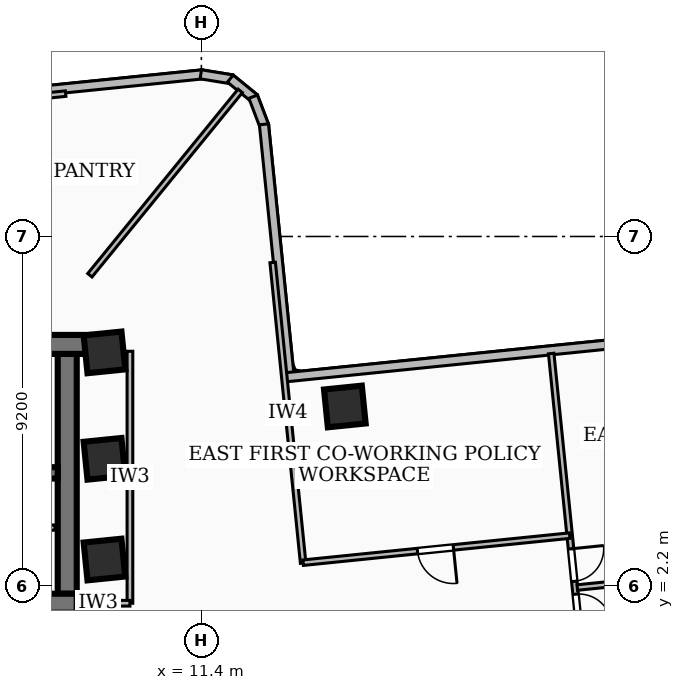
"""IFC4 building model, lengths in metres.
Left out: names, types, materials, properties, quantities, classifications, styles, units other than length and angle.
Written with IfcOpenShell. Run it as: python <this file> out.ifc"""

import sys

from ifc_helpers import new_model, si_unit, direction, frame, frame_2d, origin, origin_2d, place, context, subcontext, project, spatial, rectangle, extrude, element, fill, save


model = new_model("IFC4")
c1 = context("Model", 3, precision=1e-05, world=origin(), true_north=direction((0.0, 1.0)))
c2 = subcontext(c1, "Body", "Model", "MODEL_VIEW")
j1 = project(units=[si_unit("LENGTHUNIT", "METRE"), si_unit("PLANEANGLEUNIT", "RADIAN")], contexts=[c1])
p1 = place(None, origin())
s1 = spatial("IfcSite", under=j1, at=p1, CompositionType="ELEMENT")
p2 = place(p1, origin())
s2 = spatial("IfcBuilding", under=s1, at=p2, CompositionType="ELEMENT")
p3 = place(p2, frame((0.0, 0.0, 74.88)))
s3 = spatial("IfcBuildingStorey", under=s2, at=p3, CompositionType="ELEMENT", Elevation=74.88)
p4 = place(p3, frame((-8.78, 8.56, 0.0), z_axis=(0.0, 0.0, 1.0), x_axis=(1.0, 0.0, 0.0)))
e1 = element("IfcWall", 1, at=p4, inside=s3, PredefinedType="SHEAR", context=c2, shape_type="SweptSolid", body=[
    extrude(rectangle(XDim=17.56, YDim=0.5, at=frame_2d((8.78, 0.0))), origin(), (0.0, 0.0, 1.0), 3.34),
])
p5 = place(p3, frame((8.12, 1.75, 0.0), z_axis=(0.0, 0.0, 1.0), x_axis=(-1.0, 0.0, 0.0)))
e2 = element("IfcWall", 2, at=p5, inside=s3, PredefinedType="SHEAR", context=c2, shape_type="SweptSolid", body=[
    extrude(rectangle(XDim=16.24, YDim=0.5, at=frame_2d((8.12, 0.0))), origin(), (0.0, 0.0, 1.0), 3.34),
])
p6 = place(p5, frame((7.45, 0.0, 0.0)))
e3 = element("IfcOpeningElement", 3, at=p6, cuts=e2, PredefinedType="OPENING", context=c2, shape_type="SweptSolid", body=[
    extrude(rectangle(XDim=1.0, YDim=2.1, at=frame_2d((0.5, 1.05))), frame((0.0, 0.26, 0.0), z_axis=(0.0, -1.0, 0.0), x_axis=(1.0, 0.0, 0.0)), (0.0, 0.0, 1.0), 0.52),
])
p7 = place(p5, frame((3.4, 0.0, 0.0)))
e4 = element("IfcOpeningElement", 4, at=p7, cuts=e2, PredefinedType="OPENING", context=c2, shape_type="SweptSolid", body=[
    extrude(rectangle(XDim=0.9, YDim=2.06, at=frame_2d((0.45, 1.03))), frame((0.0, 0.26, 0.0), z_axis=(0.0, -1.0, 0.0), x_axis=(1.0, 0.0, 0.0)), (0.0, 0.0, 1.0), 0.52),
])
p8 = place(p5, frame((1.1, 0.0, 0.0)))
e5 = element("IfcOpeningElement", 5, at=p8, cuts=e2, PredefinedType="OPENING", context=c2, shape_type="SweptSolid", body=[
    extrude(rectangle(XDim=0.9, YDim=2.06, at=frame_2d((0.45, 1.03))), frame((0.0, 0.26, 0.0), z_axis=(0.0, -1.0, 0.0), x_axis=(1.0, 0.0, 0.0)), (0.0, 0.0, 1.0), 0.52),
])
p9 = place(p3, frame((7.87, 8.31, 0.0), z_axis=(0.0, 0.0, 1.0), x_axis=(0.0, -1.0, 0.0)))
e6 = element("IfcWall", 6, at=p9, inside=s3, PredefinedType="SHEAR", context=c2, shape_type="SweptSolid", body=[
    extrude(rectangle(XDim=6.31, YDim=0.5, at=frame_2d((3.155, 0.0))), origin(), (0.0, 0.0, 1.0), 3.34),
])
p10 = place(p3, frame((7.62, 5.18, 0.0), z_axis=(0.0, 0.0, 1.0), x_axis=(-1.0, 0.0, 0.0)))
e7 = element("IfcWall", 7, at=p10, inside=s3, PredefinedType="SOLIDWALL", context=c2, shape_type="SweptSolid", body=[
    extrude(rectangle(XDim=15.24, YDim=0.3, at=frame_2d((7.62, 0.0))), origin(), (0.0, 0.0, 1.0), 3.34),
])
p11 = place(p10, frame((5.77, 0.0, 0.0)))
e8 = element("IfcOpeningElement", 8, at=p11, cuts=e7, PredefinedType="OPENING", context=c2, shape_type="SweptSolid", body=[
    extrude(rectangle(XDim=1.1, YDim=2.15, at=frame_2d((0.55, 1.075))), frame((0.0, 0.16, 0.0), z_axis=(0.0, -1.0, 0.0), x_axis=(1.0, 0.0, 0.0)), (0.0, 0.0, 1.0), 0.32),
])
p12 = place(p10, frame((2.97, 0.0, 0.0)))
e9 = element("IfcOpeningElement", 9, at=p12, cuts=e7, PredefinedType="OPENING", context=c2, shape_type="SweptSolid", body=[
    extrude(rectangle(XDim=1.1, YDim=2.15, at=frame_2d((0.55, 1.075))), frame((0.0, 0.16, 0.0), z_axis=(0.0, -1.0, 0.0), x_axis=(1.0, 0.0, 0.0)), (0.0, 0.0, 1.0), 0.32),
])
p13 = place(p10, frame((7.97, 0.0, 0.0)))
e10 = element("IfcOpeningElement", 10, at=p13, cuts=e7, PredefinedType="OPENING", context=c2, shape_type="SweptSolid", body=[
    extrude(rectangle(XDim=1.0, YDim=2.1, at=frame_2d((0.5, 1.05))), frame((0.0, 0.16, 0.0), z_axis=(0.0, -1.0, 0.0), x_axis=(1.0, 0.0, 0.0)), (0.0, 0.0, 1.0), 0.32),
])
for number, where, z_axis, x_axis in (
    (11, (8.85, 2.9, 0.0), (0.0, 0.0, 1.0), (0.995, 0.101, 0.0)),
    (12, (8.85, 5.55, 0.0), (0.0, 0.0, 1.0), (0.995, 0.101, 0.0)),
    (13, (8.85, 8.35, 0.0), (0.0, 0.0, 1.0), (0.995, 0.101, 0.0)),
    (14, (15.175, 6.927, 0.0), (0.0, 0.0, 1.0), (0.995, 0.101, 0.0)),
):
    element("IfcColumn", number, at=place(p3, frame(where, z_axis=z_axis, x_axis=x_axis)), inside=s3, PredefinedType="COLUMN", context=c2, shape_type="SweptSolid", body=[
        extrude(rectangle(XDim=1.0, YDim=1.0, at=origin_2d()), origin(), (0.0, 0.0, 1.0), 3.6),
    ])
p14 = place(p3, frame((4.694, 14.981, 0.0), z_axis=(0.0, 0.0, 1.0), x_axis=(0.994875719665, 0.101105402534, 0.0)))
e15 = element("IfcWall", 15, at=p14, inside=s3, PredefinedType="SOLIDWALL", context=c2, shape_type="SweptSolid", body=[
    extrude(rectangle(XDim=6.776, YDim=0.24, at=frame_2d((3.388, 0.0))), origin(), (0.0, 0.0, 1.0), 2.486),
])
p15 = place(p3, frame((11.385, 15.667, 0.0), z_axis=(0.0, 0.0, 1.0), x_axis=(0.987091669755, -0.160156284613, 0.0)))
e16 = element("IfcWall", 16, at=p15, inside=s3, PredefinedType="SOLIDWALL", context=c2, shape_type="SweptSolid", body=[
    extrude(rectangle(XDim=0.831, YDim=0.24, at=frame_2d((0.416, 0.0))), origin(), (0.0, 0.0, 1.0), 3.34),
])
p16 = place(p3, frame((12.161, 15.554, 0.0), z_axis=(0.0, 0.0, 1.0), x_axis=(0.774946287969, -0.632027096542, 0.0)))
e17 = element("IfcWall", 17, at=p16, inside=s3, PredefinedType="SOLIDWALL", context=c2, shape_type="SweptSolid", body=[
    extrude(rectangle(XDim=0.813, YDim=0.24, at=frame_2d((0.407, 0.0))), origin(), (0.0, 0.0, 1.0), 3.34),
])
p17 = place(p3, frame((12.763, 15.079, 0.0), z_axis=(0.0, 0.0, 1.0), x_axis=(0.355469529522, -0.934687869602, 0.0)))
e18 = element("IfcWall", 18, at=p17, inside=s3, PredefinedType="SOLIDWALL", context=c2, shape_type="SweptSolid", body=[
    extrude(rectangle(XDim=0.83, YDim=0.24, at=frame_2d((0.415, 0.0))), origin(), (0.0, 0.0, 1.0), 3.34),
])
p18 = place(p3, frame((13.046, 14.351, 0.0), z_axis=(0.0, 0.0, 1.0), x_axis=(0.101248053545, -0.994861212257, 0.0)))
e19 = element("IfcWall", 19, at=p18, inside=s3, PredefinedType="SOLIDWALL", context=c2, shape_type="SweptSolid", body=[
    extrude(rectangle(XDim=6.776, YDim=0.24, at=frame_2d((3.388, 0.0))), origin(), (0.0, 0.0, 1.0), 2.644),
])
p19 = place(p3, frame((13.626, 7.696, 0.0), z_axis=(0.0, 0.0, 1.0), x_axis=(0.994872930989, 0.101132839298, 0.0)))
e20 = element("IfcWall", 20, at=p19, inside=s3, PredefinedType="SOLIDWALL", context=c2, shape_type="SweptSolid", body=[
    extrude(rectangle(XDim=16.276, YDim=0.24, at=frame_2d((8.138, 0.0))), origin(), (0.0, 0.0, 1.0), 2.644),
])
p20 = place(p3, frame((2.9, 3.74, 0.0), z_axis=(0.0, 0.0, 1.0), x_axis=(1.0, 0.0, 0.0)))
e21 = element("IfcWall", 21, at=p20, inside=s3, PredefinedType="PARTITIONING", context=c2, shape_type="SweptSolid", body=[
    extrude(rectangle(XDim=4.65, YDim=0.138, at=frame_2d((2.325, 0.0))), origin(), (0.0, 0.0, 1.0), 3.34),
])
p21 = place(p3, frame((9.52, 1.75, 0.0), z_axis=(0.0, 0.0, 1.0), x_axis=(0.0, 1.0, 0.0)))
e22 = element("IfcWall", 22, at=p21, inside=s3, PredefinedType="PARTITIONING", context=c2, shape_type="SweptSolid", body=[
    extrude(rectangle(XDim=6.63, YDim=0.15, at=frame_2d((3.315, 0.0))), origin(), (0.0, 0.0, 1.0), 2.486),
])
p22 = place(p3, frame((7.85, 1.75, 0.0), z_axis=(0.0, 0.0, 1.0), x_axis=(1.0, 0.0, 0.0)))
e23 = element("IfcWall", 23, at=p22, inside=s3, PredefinedType="PARTITIONING", context=c2, shape_type="SweptSolid", body=[
    extrude(rectangle(XDim=1.67, YDim=0.15, at=frame_2d((0.835, 0.0))), origin(), (0.0, 0.0, 1.0), 2.405),
])
p23 = place(p3, frame((8.466, 10.38, 0.0), z_axis=(0.0, 0.0, 1.0), x_axis=(0.631992375104, 0.774974604623, 0.0)))
e24 = element("IfcWall", 24, at=p23, inside=s3, PredefinedType="PARTITIONING", context=c2, shape_type="SweptSolid", body=[
    extrude(rectangle(XDim=6.26, YDim=0.145, at=frame_2d((3.13, 0.0))), origin(), (0.0, 0.0, 1.0), 2.644),
])
p24 = place(p3, frame((14.078, 2.807, 0.0), z_axis=(0.0, 0.0, 1.0), x_axis=(-0.100884076592, 0.994898187299, 0.0)))
e25 = element("IfcWall", 25, at=p24, inside=s3, PredefinedType="PARTITIONING", context=c2, shape_type="SweptSolid", body=[
    extrude(rectangle(XDim=7.95, YDim=0.145, at=frame_2d((3.975, 0.0))), origin(), (0.0, 0.0, 1.0), 2.486),
])
p25 = place(p3, frame((21.091, 3.529, 0.0), z_axis=(0.0, 0.0, 1.0), x_axis=(-0.994885188523, -0.101012185692, 0.0)))
e26 = element("IfcWall", 26, at=p25, inside=s3, PredefinedType="PARTITIONING", context=c2, shape_type="SweptSolid", body=[
    extrude(rectangle(XDim=7.05, YDim=0.145, at=frame_2d((3.525, 0.0))), origin(), (0.0, 0.0, 1.0), 3.34),
])
p26 = place(p25, frame((3.075, 0.0, 0.0)))
e27 = element("IfcOpeningElement", 27, at=p26, cuts=e26, PredefinedType="OPENING", context=c2, shape_type="SweptSolid", body=[
    extrude(rectangle(XDim=0.95, YDim=2.08, at=frame_2d((0.475, 1.04))), frame((0.0, 0.083, 0.0), z_axis=(0.0, -1.0, 0.0), x_axis=(1.0, 0.0, 0.0)), (0.0, 0.0, 1.0), 0.165),
])
p27 = place(p3, frame((21.29, 2.163, 0.0), z_axis=(0.0, 0.0, 1.0), x_axis=(0.994879916843, 0.101064093832, 0.0)))
e28 = element("IfcWall", 28, at=p27, inside=s3, PredefinedType="PARTITIONING", context=c2, shape_type="SweptSolid", body=[
    extrude(rectangle(XDim=10.595, YDim=0.145, at=frame_2d((5.298, 0.0))), origin(), (0.0, 0.0, 1.0), 2.793),
])
p28 = place(p3, frame((20.605, 8.32, 0.0), z_axis=(0.0, 0.0, 1.0), x_axis=(0.101040883761, -0.994882274346, 0.0)))
e29 = element("IfcWall", 29, at=p28, inside=s3, PredefinedType="PARTITIONING", context=c2, shape_type="SweptSolid", body=[
    extrude(rectangle(XDim=12.391, YDim=0.145, at=frame_2d((6.195, 0.0))), origin(), (0.0, 0.0, 1.0), 2.486),
])
p29 = place(p28, frame((6.365, 0.0, 0.0)))
e30 = element("IfcOpeningElement", 30, at=p29, cuts=e29, PredefinedType="OPENING", context=c2, shape_type="SweptSolid", body=[
    extrude(rectangle(XDim=0.86, YDim=2.04, at=frame_2d((0.43, 1.02))), frame((0.0, 0.083, 0.0), z_axis=(0.0, -1.0, 0.0), x_axis=(1.0, 0.0, 0.0)), (0.0, 0.0, 1.0), 0.165),
])
p30 = place(p28, frame((5.165, 0.0, 0.0)))
e31 = element("IfcOpeningElement", 31, at=p30, cuts=e29, PredefinedType="OPENING", context=c2, shape_type="SweptSolid", body=[
    extrude(rectangle(XDim=0.86, YDim=2.04, at=frame_2d((0.43, 1.02))), frame((0.0, 0.083, 0.0), z_axis=(0.0, -1.0, 0.0), x_axis=(1.0, 0.0, 0.0)), (0.0, 0.0, 1.0), 0.165),
])
p31 = place(p3, frame((7.828, 15.159, 0.0), z_axis=(0.0, 0.0, 1.0), x_axis=(-0.994873184944, -0.101130341041, 0.0)))
e32 = element("IfcWall", 32, at=p31, inside=s3, PredefinedType="PARTITIONING", context=c2, shape_type="SweptSolid", body=[
    extrude(rectangle(XDim=7.95, YDim=0.145, at=frame_2d((3.975, 0.0))), origin(), (0.0, 0.0, 1.0), 2.486),
])
p32 = place(p26, origin())
e33 = element("IfcDoor", 33, at=p32, inside=s3, OperationType="SINGLE_SWING_LEFT", PredefinedType="DOOR", context=c2, shape_type="SweptSolid", body=[
    extrude(rectangle(XDim=0.95, YDim=2.08, at=frame_2d((0.475, 1.04))), frame((0.0, 0.025, 0.0), z_axis=(0.0, -1.0, 0.0), x_axis=(1.0, 0.0, 0.0)), (0.0, 0.0, 1.0), 0.05),
])
fill(e27, e33)
p33 = place(p29, origin())
e34 = element("IfcDoor", 34, at=p33, inside=s3, OperationType="SINGLE_SWING_RIGHT", PredefinedType="DOOR", context=c2, shape_type="SweptSolid", body=[
    extrude(rectangle(XDim=0.86, YDim=2.04, at=frame_2d((0.43, 1.02))), frame((0.0, 0.025, 0.0), z_axis=(0.0, -1.0, 0.0), x_axis=(1.0, 0.0, 0.0)), (0.0, 0.0, 1.0), 0.05),
])
fill(e30, e34)
p34 = place(p30, origin())
e35 = element("IfcDoor", 35, at=p34, inside=s3, OperationType="SINGLE_SWING_LEFT", PredefinedType="DOOR", context=c2, shape_type="SweptSolid", body=[
    extrude(rectangle(XDim=0.86, YDim=2.04, at=frame_2d((0.43, 1.02))), frame((0.0, 0.025, 0.0), z_axis=(0.0, -1.0, 0.0), x_axis=(1.0, 0.0, 0.0)), (0.0, 0.0, 1.0), 0.05),
])
fill(e31, e35)
save(model, sys.argv[1])
